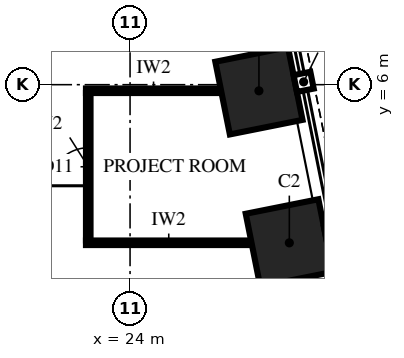
"""IFC4 building model, lengths in metres.
Left out: names, types, materials, properties, quantities, classifications, styles, units other than length and angle.
Written with IfcOpenShell. Run it as: python <this file> out.ifc"""

import sys

from ifc_helpers import new_model, si_unit, direction, frame, frame_2d, origin, origin_2d, place, context, subcontext, project, spatial, rectangle, extrude, element, fill, save


model = new_model("IFC4")
c1 = context("Model", 3, precision=1e-05, world=origin(), true_north=direction((0.0, 1.0)))
c2 = subcontext(c1, "Body", "Model", "MODEL_VIEW")
j1 = project(units=[si_unit("LENGTHUNIT", "METRE"), si_unit("PLANEANGLEUNIT", "RADIAN")], contexts=[c1])
p1 = place(None, origin())
s1 = spatial("IfcSite", under=j1, at=p1, CompositionType="ELEMENT")
p2 = place(p1, origin())
s2 = spatial("IfcBuilding", under=s1, at=p2, CompositionType="ELEMENT")
p3 = place(p2, frame((0.0, 0.0, 72.0)))
s3 = spatial("IfcBuildingStorey", under=s2, at=p3, CompositionType="ELEMENT", Elevation=72.0)
for number, where, z_axis, x_axis in (
    (1, (28.191, 1.838, 0.0), (0.0, 0.0, 1.0), (-0.196, 0.981, 0.0)),
    (2, (27.391, 5.838, 0.0), (0.0, 0.0, 1.0), (-0.196, 0.981, 0.0)),
):
    element("IfcColumn", number, at=place(p3, frame(where, z_axis=z_axis, x_axis=x_axis)), inside=s3, PredefinedType="COLUMN", context=c2, shape_type="SweptSolid", body=[
        extrude(rectangle(XDim=1.95, YDim=1.95, at=origin_2d()), origin(), (0.0, 0.0, 1.0), 4.0),
    ])
p4 = place(p3, frame((22.84, 1.84, 0.0), z_axis=(0.0, 0.0, 1.0), x_axis=(1.0, 0.0, 0.0)))
e3 = element("IfcWall", 3, at=p4, inside=s3, PredefinedType="PARTITIONING", context=c2, shape_type="SweptSolid", body=[
    extrude(rectangle(XDim=4.356, YDim=0.12, at=frame_2d((2.178, 0.0))), origin(), (0.0, 0.0, 1.0), 3.25),
])
p5 = place(p3, frame((22.84, 5.84, 0.0), z_axis=(0.0, 0.0, 1.0), x_axis=(1.0, 0.0, 0.0)))
e4 = element("IfcWall", 4, at=p5, inside=s3, PredefinedType="PARTITIONING", context=c2, shape_type="SweptSolid", body=[
    extrude(rectangle(XDim=3.556, YDim=0.12, at=frame_2d((1.778, 0.0))), origin(), (0.0, 0.0, 1.0), 2.842),
])
p6 = place(p3, frame((22.9, 1.9, 0.0), z_axis=(0.0, 0.0, 1.0), x_axis=(0.0, 1.0, 0.0)))
e5 = element("IfcWall", 5, at=p6, inside=s3, PredefinedType="PARTITIONING", context=c2, shape_type="SweptSolid", body=[
    extrude(rectangle(XDim=3.88, YDim=0.12, at=frame_2d((1.94, 0.0))), origin(), (0.0, 0.0, 1.0), 3.85),
])
p7 = place(p6, frame((1.44, 0.0, 0.0)))
e6 = element("IfcOpeningElement", 6, at=p7, cuts=e5, PredefinedType="OPENING", context=c2, shape_type="SweptSolid", body=[
    extrude(rectangle(XDim=1.0, YDim=2.4, at=frame_2d((0.5, 1.2))), frame((0.0, 0.075, 0.0), z_axis=(0.0, -1.0, 0.0), x_axis=(1.0, 0.0, 0.0)), (0.0, 0.0, 1.0), 0.15),
])
p8 = place(p7, origin())
e7 = element("IfcDoor", 7, at=p8, inside=s3, OperationType="SINGLE_SWING_RIGHT", PredefinedType="DOOR", context=c2, shape_type="SweptSolid", body=[
    extrude(rectangle(XDim=1.0, YDim=2.4, at=frame_2d((0.5, 1.2))), frame((0.0, 0.06, 0.0), z_axis=(0.0, -1.0, 0.0), x_axis=(1.0, 0.0, 0.0)), (0.0, 0.0, 1.0), 0.12),
])
fill(e6, e7)
save(model, sys.argv[1])
